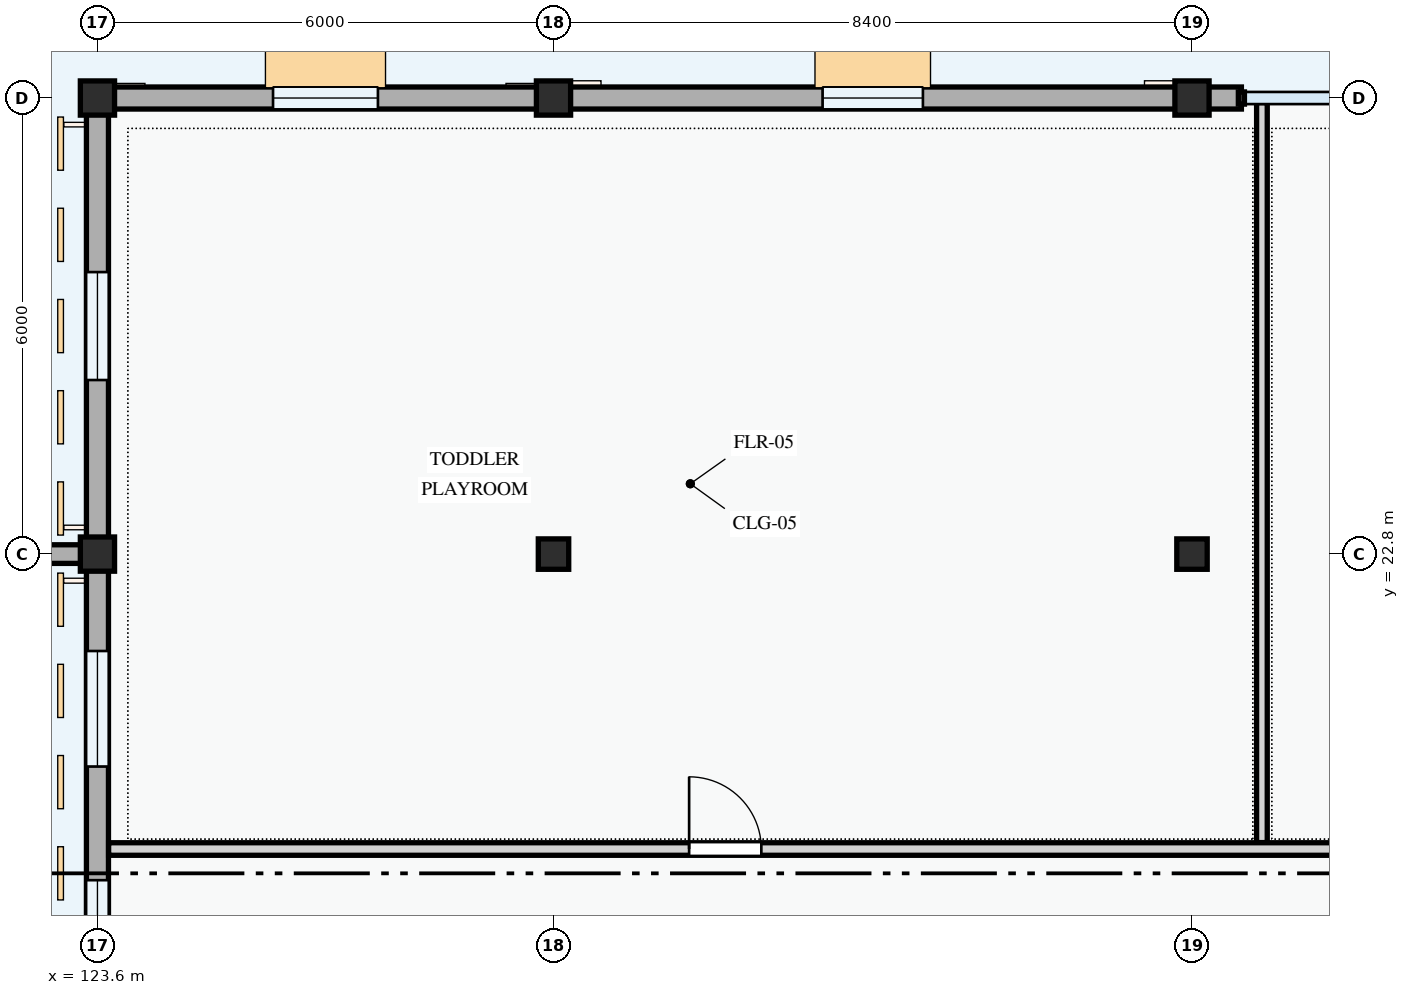
"""IFC4 building model, lengths in metres.
Left out: names, types, materials, properties, quantities, classifications, styles, units other than length and angle.
Written with IfcOpenShell. Run it as: python <this file> out.ifc"""

import sys

from ifc_helpers import new_model, si_unit, direction, frame, frame_2d, origin, origin_2d, place, context, subcontext, project, spatial, rectangle, extrude, element, fill, save


model = new_model("IFC4")
c1 = context("Model", 3, precision=1e-05, world=origin(), true_north=direction((0.0, 1.0)))
c2 = subcontext(c1, "Body", "Model", "MODEL_VIEW")
j1 = project(units=[si_unit("LENGTHUNIT", "METRE"), si_unit("PLANEANGLEUNIT", "RADIAN")], contexts=[c1])
p1 = place(None, origin())
s1 = spatial("IfcSite", under=j1, at=p1, CompositionType="ELEMENT")
p2 = place(p1, origin())
s2 = spatial("IfcBuilding", under=s1, at=p2, CompositionType="ELEMENT")
p3 = place(p2, origin())
s3 = spatial("IfcBuildingStorey", under=s2, at=p3, CompositionType="ELEMENT", Elevation=0.0)
for number, where, z_axis, x_axis in (
    (1, (123.6, 22.8, 0.0), (0.0, 0.0, 1.0), (1.0, 0.0, 0.0)),
    (2, (123.6, 28.8, 0.0), (0.0, 0.0, 1.0), (1.0, 0.0, 0.0)),
):
    element("IfcColumn", number, at=place(p3, frame(where, z_axis=z_axis, x_axis=x_axis)), inside=s3, PredefinedType="COLUMN", context=c2, shape_type="SweptSolid", body=[
        extrude(rectangle(XDim=0.45, YDim=0.45, at=origin_2d()), origin(), (0.0, 0.0, 1.0), 4.5),
    ])
p4 = place(p3, frame((129.6, 22.8, 0.0), z_axis=(0.0, 0.0, 1.0), x_axis=(1.0, 0.0, 0.0)))
e3 = element("IfcColumn", 3, at=p4, inside=s3, PredefinedType="COLUMN", context=c2, shape_type="SweptSolid", body=[
    extrude(rectangle(XDim=0.4, YDim=0.4, at=origin_2d()), origin(), (0.0, 0.0, 1.0), 4.5),
])
p5 = place(p3, frame((129.6, 28.8, 0.0), z_axis=(0.0, 0.0, 1.0), x_axis=(1.0, 0.0, 0.0)))
e4 = element("IfcColumn", 4, at=p5, inside=s3, PredefinedType="COLUMN", context=c2, shape_type="SweptSolid", body=[
    extrude(rectangle(XDim=0.45, YDim=0.45, at=origin_2d()), origin(), (0.0, 0.0, 1.0), 4.5),
])
p6 = place(p3, frame((138.0, 22.8, 0.0), z_axis=(0.0, 0.0, 1.0), x_axis=(1.0, 0.0, 0.0)))
e5 = element("IfcColumn", 5, at=p6, inside=s3, PredefinedType="COLUMN", context=c2, shape_type="SweptSolid", body=[
    extrude(rectangle(XDim=0.4, YDim=0.4, at=origin_2d()), origin(), (0.0, 0.0, 1.0), 4.5),
])
p7 = place(p3, frame((138.0, 28.8, 0.0), z_axis=(0.0, 0.0, 1.0), x_axis=(1.0, 0.0, 0.0)))
e6 = element("IfcColumn", 6, at=p7, inside=s3, PredefinedType="COLUMN", context=c2, shape_type="SweptSolid", body=[
    extrude(rectangle(XDim=0.45, YDim=0.45, at=origin_2d()), origin(), (0.0, 0.0, 1.0), 4.5),
])
p8 = place(p3, frame((138.65, 28.8, 0.0), z_axis=(0.0, 0.0, 1.0), x_axis=(-1.0, 0.0, 0.0)))
e7 = element("IfcWall", 7, at=p8, inside=s3, PredefinedType="STANDARD", context=c2, shape_type="SweptSolid", body=[
    extrude(rectangle(XDim=0.65, YDim=0.29, at=frame_2d((0.325, 0.0))), origin(), (0.0, 0.0, 1.0), 3.585),
])
p9 = place(p3, frame((138.0, 28.8, 0.0), z_axis=(0.0, 0.0, 1.0), x_axis=(-1.0, 0.0, 0.0)))
e8 = element("IfcWall", 8, at=p9, inside=s3, PredefinedType="STANDARD", context=c2, shape_type="SweptSolid", body=[
    extrude(rectangle(XDim=8.4, YDim=0.29, at=frame_2d((4.2, 0.0))), origin(), (0.0, 0.0, 1.0), 3.485),
])
p10 = place(p9, frame((3.54, 0.0, 0.72)))
e9 = element("IfcOpeningElement", 9, at=p10, cuts=e8, PredefinedType="OPENING", context=c2, shape_type="SweptSolid", body=[
    extrude(rectangle(XDim=1.32, YDim=1.35, at=frame_2d((0.66, 0.675))), frame((0.0, 0.155, 0.0), z_axis=(0.0, -1.0, 0.0), x_axis=(1.0, 0.0, 0.0)), (0.0, 0.0, 1.0), 0.31),
])
p11 = place(p3, frame((129.6, 28.8, 0.0), z_axis=(0.0, 0.0, 1.0), x_axis=(-1.0, 0.0, 0.0)))
e10 = element("IfcWall", 10, at=p11, inside=s3, PredefinedType="STANDARD", context=c2, shape_type="SweptSolid", body=[
    extrude(rectangle(XDim=6.0, YDim=0.29, at=frame_2d((3.0, 0.0))), origin(), (0.0, 0.0, 1.0), 3.585),
])
p12 = place(p11, frame((2.31, 0.0, 0.72)))
e11 = element("IfcOpeningElement", 11, at=p12, cuts=e10, PredefinedType="OPENING", context=c2, shape_type="SweptSolid", body=[
    extrude(rectangle(XDim=1.38, YDim=1.48, at=frame_2d((0.69, 0.74))), frame((0.0, 0.155, 0.0), z_axis=(0.0, -1.0, 0.0), x_axis=(1.0, 0.0, 0.0)), (0.0, 0.0, 1.0), 0.31),
])
p13 = place(p3, frame((123.6, 28.8, 0.0), z_axis=(0.0, 0.0, 1.0), x_axis=(0.0, -1.0, 0.0)))
e12 = element("IfcWall", 12, at=p13, inside=s3, PredefinedType="STANDARD", context=c2, shape_type="SweptSolid", body=[
    extrude(rectangle(XDim=6.0, YDim=0.29, at=frame_2d((3.0, 0.0))), origin(), (0.0, 0.0, 1.0), 3.585),
])
p14 = place(p13, frame((2.29, 0.0, 0.72)))
e13 = element("IfcOpeningElement", 13, at=p14, cuts=e12, PredefinedType="OPENING", context=c2, shape_type="SweptSolid", body=[
    extrude(rectangle(XDim=1.42, YDim=1.38, at=frame_2d((0.71, 0.69))), frame((0.0, 0.155, 0.0), z_axis=(0.0, -1.0, 0.0), x_axis=(1.0, 0.0, 0.0)), (0.0, 0.0, 1.0), 0.31),
])
p15 = place(p3, frame((123.6, 22.8, 0.0), z_axis=(0.0, 0.0, 1.0), x_axis=(0.0, -1.0, 0.0)))
e14 = element("IfcWall", 14, at=p15, inside=s3, PredefinedType="STANDARD", context=c2, shape_type="SweptSolid", body=[
    extrude(rectangle(XDim=8.4, YDim=0.29, at=frame_2d((4.2, 0.0))), origin(), (0.0, 0.0, 1.0), 3.485),
])
p16 = place(p15, frame((1.275, 0.0, 0.72)))
e15 = element("IfcOpeningElement", 15, at=p16, cuts=e14, PredefinedType="OPENING", context=c2, shape_type="SweptSolid", body=[
    extrude(rectangle(XDim=1.52, YDim=1.42, at=frame_2d((0.76, 0.71))), frame((0.0, 0.155, 0.0), z_axis=(0.0, -1.0, 0.0), x_axis=(1.0, 0.0, 0.0)), (0.0, 0.0, 1.0), 0.31),
])
p17 = place(p15, frame((4.29, 0.0, 0.72)))
e16 = element("IfcOpeningElement", 16, at=p17, cuts=e14, PredefinedType="OPENING", context=c2, shape_type="SweptSolid", body=[
    extrude(rectangle(XDim=2.28, YDim=1.46, at=frame_2d((1.14, 0.73))), frame((0.0, 0.155, 0.0), z_axis=(0.0, -1.0, 0.0), x_axis=(1.0, 0.0, 0.0)), (0.0, 0.0, 1.0), 0.31),
])
p18 = place(p3, frame((115.2, 22.8, 0.0), z_axis=(0.0, 0.0, 1.0), x_axis=(1.0, 0.0, 0.0)))
e17 = element("IfcWall", 17, at=p18, inside=s3, PredefinedType="STANDARD", context=c2, shape_type="SweptSolid", body=[
    extrude(rectangle(XDim=8.4, YDim=0.245, at=frame_2d((4.2, 0.0))), origin(), (0.0, 0.0, 1.0), 2.35),
])
p19 = place(p18, frame((3.275, 0.0, 0.0)))
e18 = element("IfcOpeningElement", 18, at=p19, cuts=e17, PredefinedType="OPENING", context=c2, shape_type="SweptSolid", body=[
    extrude(rectangle(XDim=1.85, YDim=2.15, at=frame_2d((0.925, 1.075))), frame((0.0, 0.133, 0.0), z_axis=(0.0, -1.0, 0.0), x_axis=(1.0, 0.0, 0.0)), (0.0, 0.0, 1.0), 0.265),
])
p20 = place(p3, frame((138.92, 19.004, 0.0), z_axis=(0.0, 0.0, 1.0), x_axis=(0.0, 1.0, 0.0)))
e19 = element("IfcWall", 19, at=p20, inside=s3, PredefinedType="PARTITIONING", context=c2, shape_type="SweptSolid", body=[
    extrude(rectangle(XDim=9.736, YDim=0.14, at=frame_2d((4.868, 0.0))), origin(), (0.0, 0.0, 1.0), 4.2),
])
p21 = place(p3, frame((123.747, 18.92, 0.0), z_axis=(0.0, 0.0, 1.0), x_axis=(1.0, 0.0, 0.0)))
e20 = element("IfcWall", 20, at=p21, inside=s3, PredefinedType="PARTITIONING", context=c2, shape_type="SweptSolid", body=[
    extrude(rectangle(XDim=42.906, YDim=0.165, at=frame_2d((21.453, 0.0))), origin(), (0.0, 0.0, 1.0), 4.2),
])
p22 = place(p21, frame((7.637, 0.0, 0.0)))
e21 = element("IfcOpeningElement", 21, at=p22, cuts=e20, PredefinedType="OPENING", context=c2, shape_type="SweptSolid", body=[
    extrude(rectangle(XDim=0.95, YDim=2.1, at=frame_2d((0.475, 1.05))), frame((0.0, 0.093, 0.0), z_axis=(0.0, -1.0, 0.0), x_axis=(1.0, 0.0, 0.0)), (0.0, 0.0, 1.0), 0.185),
])
p23 = place(p21, frame((21.812, 0.0, 0.0)))
e22 = element("IfcOpeningElement", 22, at=p23, cuts=e20, PredefinedType="OPENING", context=c2, shape_type="SweptSolid", body=[
    extrude(rectangle(XDim=0.95, YDim=2.1, at=frame_2d((0.475, 1.05))), frame((0.0, 0.093, 0.0), z_axis=(0.0, -1.0, 0.0), x_axis=(1.0, 0.0, 0.0)), (0.0, 0.0, 1.0), 0.185),
])
p24 = place(p21, frame((32.69, 0.0, 0.0)))
e23 = element("IfcOpeningElement", 23, at=p24, cuts=e20, PredefinedType="OPENING", context=c2, shape_type="SweptSolid", body=[
    extrude(rectangle(XDim=0.9, YDim=2.1, at=frame_2d((0.45, 1.05))), frame((0.0, 0.093, 0.0), z_axis=(0.0, -1.0, 0.0), x_axis=(1.0, 0.0, 0.0)), (0.0, 0.0, 1.0), 0.185),
])
p25 = place(p21, frame((38.905, 0.0, 0.0)))
e24 = element("IfcOpeningElement", 24, at=p25, cuts=e20, PredefinedType="OPENING", context=c2, shape_type="SweptSolid", body=[
    extrude(rectangle(XDim=0.95, YDim=2.1, at=frame_2d((0.475, 1.05))), frame((0.0, 0.093, 0.0), z_axis=(0.0, -1.0, 0.0), x_axis=(1.0, 0.0, 0.0)), (0.0, 0.0, 1.0), 0.185),
])
p26 = place(p10, origin())
e25 = element("IfcWindow", 25, at=p26, inside=s3, PartitioningType="SINGLE_PANEL", PredefinedType="WINDOW", context=c2, shape_type="SweptSolid", body=[
    extrude(rectangle(XDim=1.32, YDim=1.35, at=frame_2d((0.66, 0.675))), frame((0.0, 0.03, 0.0), z_axis=(0.0, -1.0, 0.0), x_axis=(1.0, 0.0, 0.0)), (0.0, 0.0, 1.0), 0.06),
])
fill(e9, e25)
p27 = place(p12, origin())
e26 = element("IfcWindow", 26, at=p27, inside=s3, PartitioningType="SINGLE_PANEL", PredefinedType="WINDOW", context=c2, shape_type="SweptSolid", body=[
    extrude(rectangle(XDim=1.38, YDim=1.48, at=frame_2d((0.69, 0.74))), frame((0.0, 0.03, 0.0), z_axis=(0.0, -1.0, 0.0), x_axis=(1.0, 0.0, 0.0)), (0.0, 0.0, 1.0), 0.06),
])
fill(e11, e26)
p28 = place(p14, origin())
e27 = element("IfcWindow", 27, at=p28, inside=s3, PartitioningType="SINGLE_PANEL", PredefinedType="WINDOW", context=c2, shape_type="SweptSolid", body=[
    extrude(rectangle(XDim=1.42, YDim=1.38, at=frame_2d((0.71, 0.69))), frame((0.0, 0.03, 0.0), z_axis=(0.0, -1.0, 0.0), x_axis=(1.0, 0.0, 0.0)), (0.0, 0.0, 1.0), 0.06),
])
fill(e13, e27)
p29 = place(p16, origin())
e28 = element("IfcWindow", 28, at=p29, inside=s3, PartitioningType="SINGLE_PANEL", PredefinedType="WINDOW", context=c2, shape_type="SweptSolid", body=[
    extrude(rectangle(XDim=1.52, YDim=1.42, at=frame_2d((0.76, 0.71))), frame((0.0, 0.03, 0.0), z_axis=(0.0, -1.0, 0.0), x_axis=(1.0, 0.0, 0.0)), (0.0, 0.0, 1.0), 0.06),
])
fill(e15, e28)
p30 = place(p17, origin())
e29 = element("IfcWindow", 29, at=p30, inside=s3, PartitioningType="DOUBLE_PANEL_VERTICAL", PredefinedType="WINDOW", context=c2, shape_type="SweptSolid", body=[
    extrude(rectangle(XDim=2.28, YDim=1.46, at=frame_2d((1.14, 0.73))), frame((0.0, 0.03, 0.0), z_axis=(0.0, -1.0, 0.0), x_axis=(1.0, 0.0, 0.0)), (0.0, 0.0, 1.0), 0.06),
])
fill(e16, e29)
p31 = place(p22, origin())
e30 = element("IfcDoor", 30, at=p31, inside=s3, OperationType="SINGLE_SWING_LEFT", PredefinedType="DOOR", context=c2, shape_type="SweptSolid", body=[
    extrude(rectangle(XDim=0.95, YDim=2.1, at=frame_2d((0.475, 1.05))), frame((0.0, 0.025, 0.0), z_axis=(0.0, -1.0, 0.0), x_axis=(1.0, 0.0, 0.0)), (0.0, 0.0, 1.0), 0.05),
])
fill(e21, e30)
save(model, sys.argv[1])
